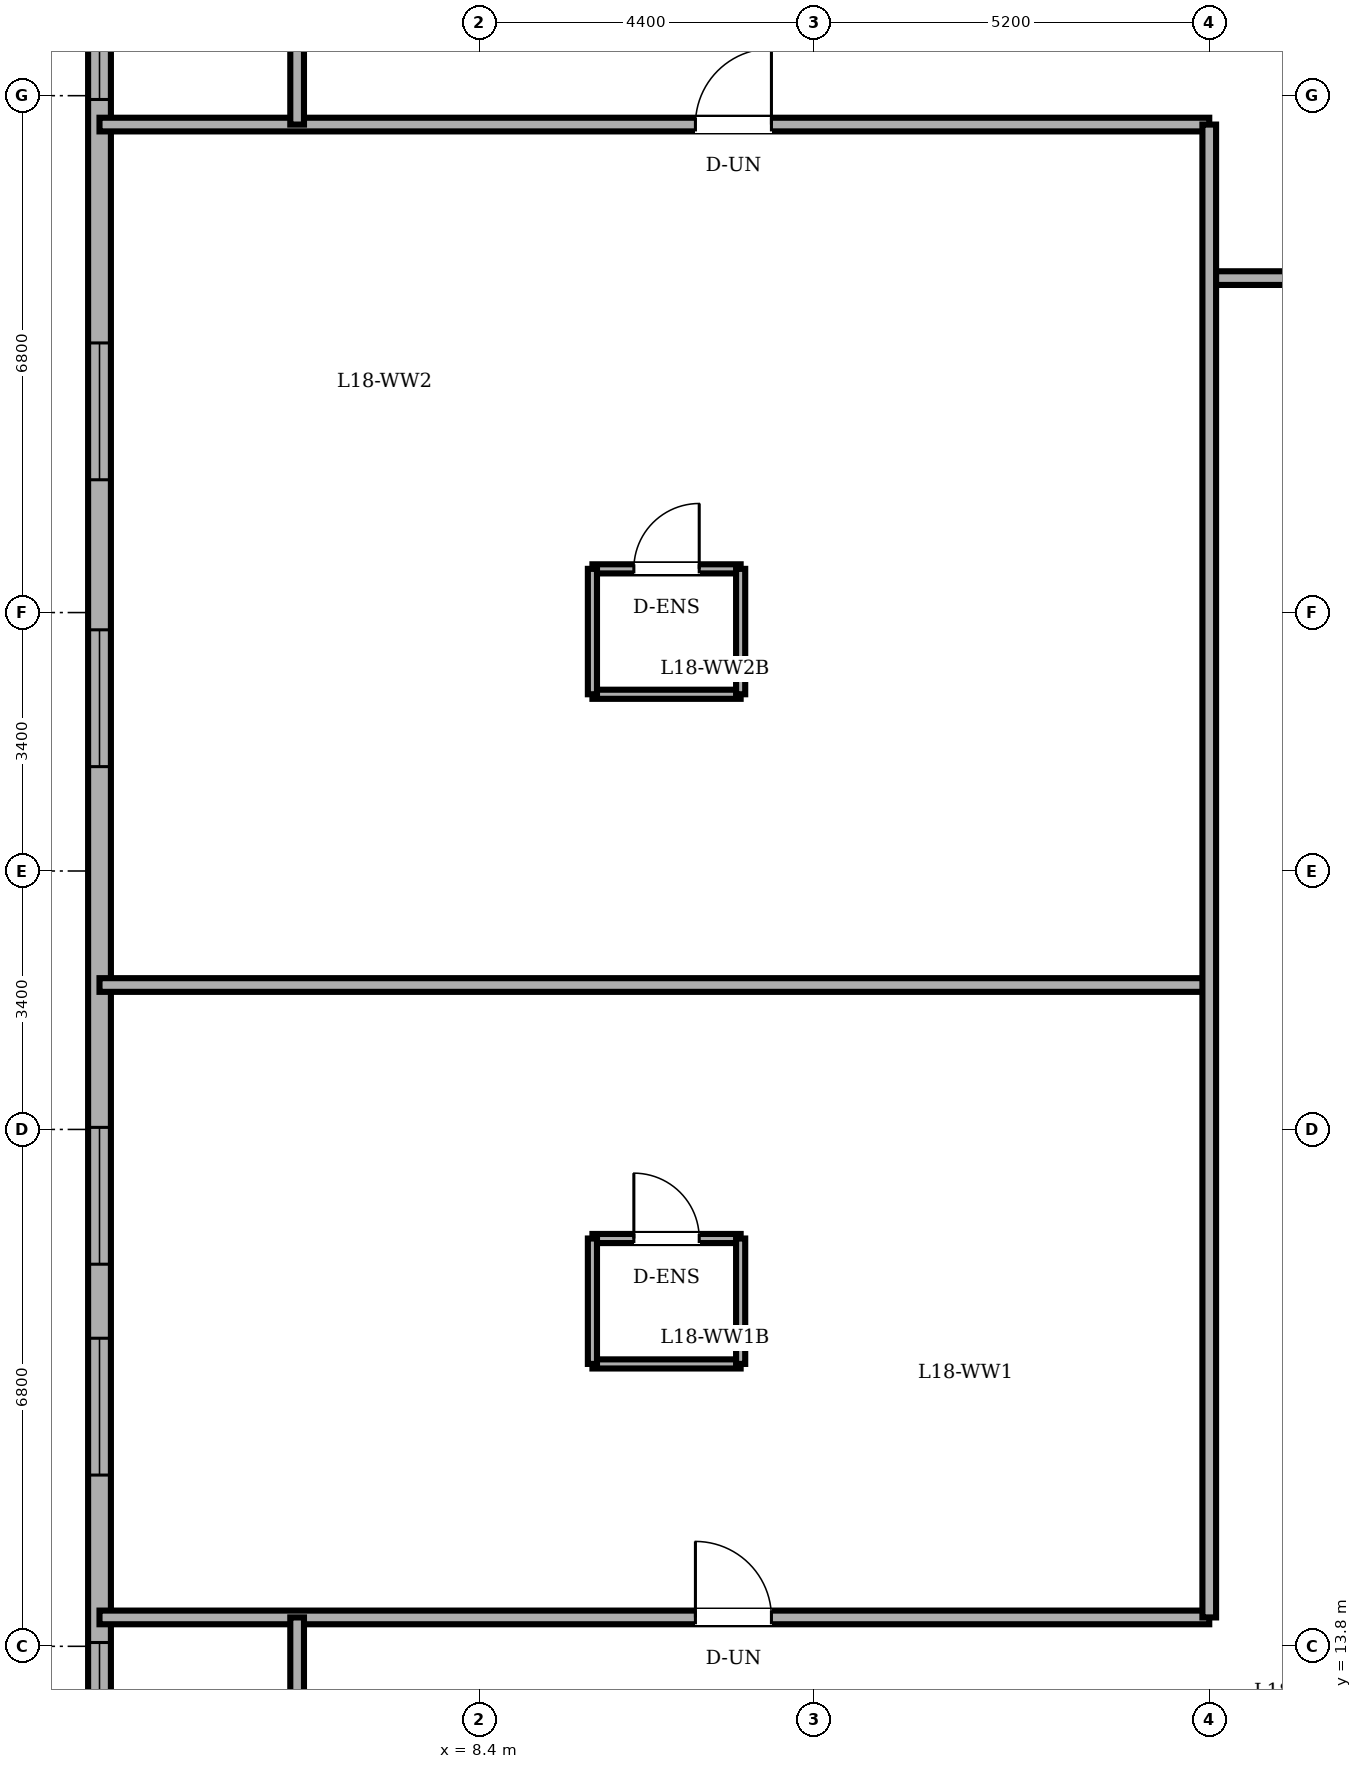
"""IFC4 building model, lengths in metres.
Left out: names, types, materials, properties, quantities, classifications, styles, units other than length and angle.
Written with IfcOpenShell. Run it as: python <this file> out.ifc"""

import sys

from ifc_helpers import new_model, si_unit, direction, frame, frame_2d, origin, place, context, subcontext, project, spatial, rectangle, extrude, element, fill, save


model = new_model("IFC4")
c1 = context("Model", 3, precision=1e-05, world=origin(), true_north=direction((0.0, 1.0)))
c2 = subcontext(c1, "Body", "Model", "MODEL_VIEW")
j1 = project(units=[si_unit("LENGTHUNIT", "METRE"), si_unit("PLANEANGLEUNIT", "RADIAN")], contexts=[c1])
p1 = place(None, origin())
s1 = spatial("IfcSite", under=j1, at=p1, CompositionType="ELEMENT")
p2 = place(p1, origin())
s2 = spatial("IfcBuilding", under=s1, at=p2, CompositionType="ELEMENT")
p3 = place(p2, frame((0.0, 0.0, 68.4)))
s3 = spatial("IfcBuildingStorey", under=s2, at=p3, CompositionType="ELEMENT", Elevation=68.4)
p4 = place(p3, frame((3.4, 40.2, 0.0), z_axis=(0.0, 0.0, 1.0), x_axis=(0.0, -1.0, 0.0)))
e1 = element("IfcWall", 1, at=p4, inside=s3, PredefinedType="SOLIDWALL", context=c2, shape_type="SweptSolid", body=[
    extrude(rectangle(XDim=32.4, YDim=0.3, at=frame_2d((16.2, 0.0))), origin(), (0.0, 0.0, 1.0), 3.4),
])
p5 = place(p4, frame((1.235, 0.0, 0.85)))
e2 = element("IfcOpeningElement", 2, at=p5, cuts=e1, PredefinedType="OPENING", context=c2, shape_type="SweptSolid", body=[
    extrude(rectangle(XDim=1.8, YDim=1.55, at=frame_2d((0.9, 0.775))), frame((0.0, 0.16, 0.0), z_axis=(0.0, -1.0, 0.0), x_axis=(1.0, 0.0, 0.0)), (0.0, 0.0, 1.0), 0.32),
])
p6 = place(p4, frame((4.25, 0.0, 0.85)))
e3 = element("IfcOpeningElement", 3, at=p6, cuts=e1, PredefinedType="OPENING", context=c2, shape_type="SweptSolid", body=[
    extrude(rectangle(XDim=1.8, YDim=1.55, at=frame_2d((0.9, 0.775))), frame((0.0, 0.16, 0.0), z_axis=(0.0, -1.0, 0.0), x_axis=(1.0, 0.0, 0.0)), (0.0, 0.0, 1.0), 0.32),
])
p7 = place(p4, frame((9.253, 0.0, 0.85)))
e4 = element("IfcOpeningElement", 4, at=p7, cuts=e1, PredefinedType="OPENING", context=c2, shape_type="SweptSolid", body=[
    extrude(rectangle(XDim=1.8, YDim=1.55, at=frame_2d((0.9, 0.775))), frame((0.0, 0.16, 0.0), z_axis=(0.0, -1.0, 0.0), x_axis=(1.0, 0.0, 0.0)), (0.0, 0.0, 1.0), 0.32),
])
p8 = place(p4, frame((13.027, 0.0, 0.85)))
e5 = element("IfcOpeningElement", 5, at=p8, cuts=e1, PredefinedType="OPENING", context=c2, shape_type="SweptSolid", body=[
    extrude(rectangle(XDim=1.8, YDim=1.55, at=frame_2d((0.9, 0.775))), frame((0.0, 0.16, 0.0), z_axis=(0.0, -1.0, 0.0), x_axis=(1.0, 0.0, 0.0)), (0.0, 0.0, 1.0), 0.32),
])
p9 = place(p4, frame((19.573, 0.0, 0.85)))
e6 = element("IfcOpeningElement", 6, at=p9, cuts=e1, PredefinedType="OPENING", context=c2, shape_type="SweptSolid", body=[
    extrude(rectangle(XDim=1.8, YDim=1.55, at=frame_2d((0.9, 0.775))), frame((0.0, 0.16, 0.0), z_axis=(0.0, -1.0, 0.0), x_axis=(1.0, 0.0, 0.0)), (0.0, 0.0, 1.0), 0.32),
])
p10 = place(p4, frame((22.347, 0.0, 0.85)))
e7 = element("IfcOpeningElement", 7, at=p10, cuts=e1, PredefinedType="OPENING", context=c2, shape_type="SweptSolid", body=[
    extrude(rectangle(XDim=1.8, YDim=1.55, at=frame_2d((0.9, 0.775))), frame((0.0, 0.16, 0.0), z_axis=(0.0, -1.0, 0.0), x_axis=(1.0, 0.0, 0.0)), (0.0, 0.0, 1.0), 0.32),
])
p11 = place(p4, frame((26.35, 0.0, 0.85)))
e8 = element("IfcOpeningElement", 8, at=p11, cuts=e1, PredefinedType="OPENING", context=c2, shape_type="SweptSolid", body=[
    extrude(rectangle(XDim=1.8, YDim=1.55, at=frame_2d((0.9, 0.775))), frame((0.0, 0.16, 0.0), z_axis=(0.0, -1.0, 0.0), x_axis=(1.0, 0.0, 0.0)), (0.0, 0.0, 1.0), 0.32),
])
p12 = place(p4, frame((29.365, 0.0, 0.85)))
e9 = element("IfcOpeningElement", 9, at=p12, cuts=e1, PredefinedType="OPENING", context=c2, shape_type="SweptSolid", body=[
    extrude(rectangle(XDim=1.8, YDim=1.55, at=frame_2d((0.9, 0.775))), frame((0.0, 0.16, 0.0), z_axis=(0.0, -1.0, 0.0), x_axis=(1.0, 0.0, 0.0)), (0.0, 0.0, 1.0), 0.32),
])
p13 = place(p3, frame((9.885, 19.165, 0.0), z_axis=(0.0, 0.0, 1.0), x_axis=(1.0, 0.0, 0.0)))
e10 = element("IfcWall", 10, at=p13, inside=s3, PredefinedType="PARTITIONING", context=c2, shape_type="SweptSolid", body=[
    extrude(rectangle(XDim=1.95, YDim=0.12, at=frame_2d((0.975, 0.0))), origin(), (0.0, 0.0, 1.0), 3.4),
])
p14 = place(p13, frame((0.545, 0.0, 0.0)))
e11 = element("IfcOpeningElement", 11, at=p14, cuts=e10, PredefinedType="OPENING", context=c2, shape_type="SweptSolid", body=[
    extrude(rectangle(XDim=0.86, YDim=2.1, at=frame_2d((0.43, 1.05))), frame((0.0, 0.07, 0.0), z_axis=(0.0, -1.0, 0.0), x_axis=(1.0, 0.0, 0.0)), (0.0, 0.0, 1.0), 0.14),
])
p15 = place(p3, frame((11.835, 17.515, 0.0), z_axis=(0.0, 0.0, 1.0), x_axis=(-1.0, 0.0, 0.0)))
e12 = element("IfcWall", 12, at=p15, inside=s3, PredefinedType="PARTITIONING", context=c2, shape_type="SweptSolid", body=[
    extrude(rectangle(XDim=1.95, YDim=0.12, at=frame_2d((0.975, 0.0))), origin(), (0.0, 0.0, 1.0), 3.4),
])
for number, where, z_axis, x_axis in (
    (13, (9.885, 19.165, 0.0), (0.0, 0.0, 1.0), (0.0, -1.0, 0.0)),
    (14, (11.835, 17.515, 0.0), (0.0, 0.0, 1.0), (0.0, 1.0, 0.0)),
):
    element("IfcWall", number, at=place(p3, frame(where, z_axis=z_axis, x_axis=x_axis)), inside=s3, PredefinedType="PARTITIONING", context=c2, shape_type="SweptSolid", body=[
        extrude(rectangle(XDim=1.65, YDim=0.12, at=frame_2d((0.825, 0.0))), origin(), (0.0, 0.0, 1.0), 3.4),
    ])
p16 = place(p3, frame((9.885, 27.975, 0.0), z_axis=(0.0, 0.0, 1.0), x_axis=(1.0, 0.0, 0.0)))
e15 = element("IfcWall", 15, at=p16, inside=s3, PredefinedType="PARTITIONING", context=c2, shape_type="SweptSolid", body=[
    extrude(rectangle(XDim=1.95, YDim=0.12, at=frame_2d((0.975, 0.0))), origin(), (0.0, 0.0, 1.0), 3.4),
])
p17 = place(p16, frame((0.545, 0.0, 0.0)))
e16 = element("IfcOpeningElement", 16, at=p17, cuts=e15, PredefinedType="OPENING", context=c2, shape_type="SweptSolid", body=[
    extrude(rectangle(XDim=0.86, YDim=2.1, at=frame_2d((0.43, 1.05))), frame((0.0, 0.07, 0.0), z_axis=(0.0, -1.0, 0.0), x_axis=(1.0, 0.0, 0.0)), (0.0, 0.0, 1.0), 0.14),
])
p18 = place(p3, frame((11.835, 26.325, 0.0), z_axis=(0.0, 0.0, 1.0), x_axis=(-1.0, 0.0, 0.0)))
e17 = element("IfcWall", 17, at=p18, inside=s3, PredefinedType="PARTITIONING", context=c2, shape_type="SweptSolid", body=[
    extrude(rectangle(XDim=1.95, YDim=0.12, at=frame_2d((0.975, 0.0))), origin(), (0.0, 0.0, 1.0), 3.4),
])
for number, where, z_axis, x_axis in (
    (18, (9.885, 27.975, 0.0), (0.0, 0.0, 1.0), (0.0, -1.0, 0.0)),
    (19, (11.835, 26.325, 0.0), (0.0, 0.0, 1.0), (0.0, 1.0, 0.0)),
):
    element("IfcWall", number, at=place(p3, frame(where, z_axis=z_axis, x_axis=x_axis)), inside=s3, PredefinedType="PARTITIONING", context=c2, shape_type="SweptSolid", body=[
        extrude(rectangle(XDim=1.65, YDim=0.12, at=frame_2d((0.825, 0.0))), origin(), (0.0, 0.0, 1.0), 3.4),
    ])
p19 = place(p3, frame((3.4, 14.18, 0.0), z_axis=(0.0, 0.0, 1.0), x_axis=(1.0, 0.0, 0.0)))
e20 = element("IfcWall", 20, at=p19, inside=s3, PredefinedType="PARTITIONING", context=c2, shape_type="SweptSolid", body=[
    extrude(rectangle(XDim=14.6, YDim=0.18, at=frame_2d((7.3, 0.0))), origin(), (0.0, 0.0, 1.0), 3.4),
])
p20 = place(p19, frame((7.84, 0.0, 0.0)))
e21 = element("IfcOpeningElement", 21, at=p20, cuts=e20, PredefinedType="OPENING", context=c2, shape_type="SweptSolid", body=[
    extrude(rectangle(XDim=1.0, YDim=2.15, at=frame_2d((0.5, 1.075))), frame((0.0, 0.1, 0.0), z_axis=(0.0, -1.0, 0.0), x_axis=(1.0, 0.0, 0.0)), (0.0, 0.0, 1.0), 0.2),
])
p21 = place(p3, frame((3.4, 22.5, 0.0), z_axis=(0.0, 0.0, 1.0), x_axis=(1.0, 0.0, 0.0)))
e22 = element("IfcWall", 22, at=p21, inside=s3, PredefinedType="PARTITIONING", context=c2, shape_type="SweptSolid", body=[
    extrude(rectangle(XDim=14.6, YDim=0.18, at=frame_2d((7.3, 0.0))), origin(), (0.0, 0.0, 1.0), 3.4),
])
p22 = place(p3, frame((18.0, 31.8, 0.0), z_axis=(0.0, 0.0, 1.0), x_axis=(1.0, 0.0, 0.0)))
e23 = element("IfcWall", 23, at=p22, inside=s3, PredefinedType="PARTITIONING", context=c2, shape_type="SweptSolid", body=[
    extrude(rectangle(XDim=2.35, YDim=0.18, at=frame_2d((1.175, 0.0))), origin(), (0.0, 0.0, 1.0), 3.4),
])
p23 = place(p3, frame((3.4, 33.82, 0.0), z_axis=(0.0, 0.0, 1.0), x_axis=(1.0, 0.0, 0.0)))
e24 = element("IfcWall", 24, at=p23, inside=s3, PredefinedType="PARTITIONING", context=c2, shape_type="SweptSolid", body=[
    extrude(rectangle(XDim=14.6, YDim=0.18, at=frame_2d((7.3, 0.0))), origin(), (0.0, 0.0, 1.0), 3.4),
])
p24 = place(p23, frame((7.84, 0.0, 0.0)))
e25 = element("IfcOpeningElement", 25, at=p24, cuts=e24, PredefinedType="OPENING", context=c2, shape_type="SweptSolid", body=[
    extrude(rectangle(XDim=1.0, YDim=2.15, at=frame_2d((0.5, 1.075))), frame((0.0, 0.1, 0.0), z_axis=(0.0, -1.0, 0.0), x_axis=(1.0, 0.0, 0.0)), (0.0, 0.0, 1.0), 0.2),
])
for number, where, z_axis, x_axis in (
    (26, (6.0, 11.72, 0.0), (0.0, 0.0, 1.0), (0.0, 1.0, 0.0)),
    (27, (6.0, 33.82, 0.0), (0.0, 0.0, 1.0), (0.0, 1.0, 0.0)),
):
    element("IfcWall", number, at=place(p3, frame(where, z_axis=z_axis, x_axis=x_axis)), inside=s3, PredefinedType="PARTITIONING", context=c2, shape_type="SweptSolid", body=[
        extrude(rectangle(XDim=2.46, YDim=0.18, at=frame_2d((1.23, 0.0))), origin(), (0.0, 0.0, 1.0), 3.4),
    ])
p25 = place(p3, frame((18.0, 14.18, 0.0), z_axis=(0.0, 0.0, 1.0), x_axis=(0.0, 1.0, 0.0)))
e28 = element("IfcWall", 28, at=p25, inside=s3, PredefinedType="PARTITIONING", context=c2, shape_type="SweptSolid", body=[
    extrude(rectangle(XDim=19.64, YDim=0.18, at=frame_2d((9.82, 0.0))), origin(), (0.0, 0.0, 1.0), 3.4),
])
p26 = place(p6, origin())
e29 = element("IfcWindow", 29, at=p26, inside=s3, PartitioningType="DOUBLE_PANEL_VERTICAL", PredefinedType="WINDOW", context=c2, shape_type="SweptSolid", body=[
    extrude(rectangle(XDim=1.8, YDim=1.55, at=frame_2d((0.9, 0.775))), frame((0.0, 0.03, 0.0), z_axis=(0.0, -1.0, 0.0), x_axis=(1.0, 0.0, 0.0)), (0.0, 0.0, 1.0), 0.06),
])
fill(e3, e29)
p27 = place(p7, origin())
e30 = element("IfcWindow", 30, at=p27, inside=s3, PartitioningType="DOUBLE_PANEL_VERTICAL", PredefinedType="WINDOW", context=c2, shape_type="SweptSolid", body=[
    extrude(rectangle(XDim=1.8, YDim=1.55, at=frame_2d((0.9, 0.775))), frame((0.0, 0.03, 0.0), z_axis=(0.0, -1.0, 0.0), x_axis=(1.0, 0.0, 0.0)), (0.0, 0.0, 1.0), 0.06),
])
fill(e4, e30)
p28 = place(p8, origin())
e31 = element("IfcWindow", 31, at=p28, inside=s3, PartitioningType="DOUBLE_PANEL_VERTICAL", PredefinedType="WINDOW", context=c2, shape_type="SweptSolid", body=[
    extrude(rectangle(XDim=1.8, YDim=1.55, at=frame_2d((0.9, 0.775))), frame((0.0, 0.03, 0.0), z_axis=(0.0, -1.0, 0.0), x_axis=(1.0, 0.0, 0.0)), (0.0, 0.0, 1.0), 0.06),
])
fill(e5, e31)
p29 = place(p9, origin())
e32 = element("IfcWindow", 32, at=p29, inside=s3, PartitioningType="DOUBLE_PANEL_VERTICAL", PredefinedType="WINDOW", context=c2, shape_type="SweptSolid", body=[
    extrude(rectangle(XDim=1.8, YDim=1.55, at=frame_2d((0.9, 0.775))), frame((0.0, 0.03, 0.0), z_axis=(0.0, -1.0, 0.0), x_axis=(1.0, 0.0, 0.0)), (0.0, 0.0, 1.0), 0.06),
])
fill(e6, e32)
p30 = place(p10, origin())
e33 = element("IfcWindow", 33, at=p30, inside=s3, PartitioningType="DOUBLE_PANEL_VERTICAL", PredefinedType="WINDOW", context=c2, shape_type="SweptSolid", body=[
    extrude(rectangle(XDim=1.8, YDim=1.55, at=frame_2d((0.9, 0.775))), frame((0.0, 0.03, 0.0), z_axis=(0.0, -1.0, 0.0), x_axis=(1.0, 0.0, 0.0)), (0.0, 0.0, 1.0), 0.06),
])
fill(e7, e33)
p31 = place(p11, origin())
e34 = element("IfcWindow", 34, at=p31, inside=s3, PartitioningType="DOUBLE_PANEL_VERTICAL", PredefinedType="WINDOW", context=c2, shape_type="SweptSolid", body=[
    extrude(rectangle(XDim=1.8, YDim=1.55, at=frame_2d((0.9, 0.775))), frame((0.0, 0.03, 0.0), z_axis=(0.0, -1.0, 0.0), x_axis=(1.0, 0.0, 0.0)), (0.0, 0.0, 1.0), 0.06),
])
fill(e8, e34)
p32 = place(p14, origin())
e35 = element("IfcDoor", 35, at=p32, inside=s3, OperationType="SINGLE_SWING_LEFT", PredefinedType="DOOR", context=c2, shape_type="SweptSolid", body=[
    extrude(rectangle(XDim=0.86, YDim=2.1, at=frame_2d((0.43, 1.05))), frame((0.0, 0.025, 0.0), z_axis=(0.0, -1.0, 0.0), x_axis=(1.0, 0.0, 0.0)), (0.0, 0.0, 1.0), 0.05),
])
fill(e11, e35)
p33 = place(p17, origin())
e36 = element("IfcDoor", 36, at=p33, inside=s3, OperationType="SINGLE_SWING_RIGHT", PredefinedType="DOOR", context=c2, shape_type="SweptSolid", body=[
    extrude(rectangle(XDim=0.86, YDim=2.1, at=frame_2d((0.43, 1.05))), frame((0.0, 0.025, 0.0), z_axis=(0.0, -1.0, 0.0), x_axis=(1.0, 0.0, 0.0)), (0.0, 0.0, 1.0), 0.05),
])
fill(e16, e36)
p34 = place(p20, origin())
e37 = element("IfcDoor", 37, at=p34, inside=s3, OperationType="SINGLE_SWING_LEFT", PredefinedType="DOOR", context=c2, shape_type="SweptSolid", body=[
    extrude(rectangle(XDim=1.0, YDim=2.15, at=frame_2d((0.5, 1.075))), frame((0.0, 0.025, 0.0), z_axis=(0.0, -1.0, 0.0), x_axis=(1.0, 0.0, 0.0)), (0.0, 0.0, 1.0), 0.05),
])
fill(e21, e37)
p35 = place(p24, origin())
e38 = element("IfcDoor", 38, at=p35, inside=s3, OperationType="SINGLE_SWING_RIGHT", PredefinedType="DOOR", context=c2, shape_type="SweptSolid", body=[
    extrude(rectangle(XDim=1.0, YDim=2.15, at=frame_2d((0.5, 1.075))), frame((0.0, 0.025, 0.0), z_axis=(0.0, -1.0, 0.0), x_axis=(1.0, 0.0, 0.0)), (0.0, 0.0, 1.0), 0.05),
])
fill(e25, e38)
save(model, sys.argv[1])
